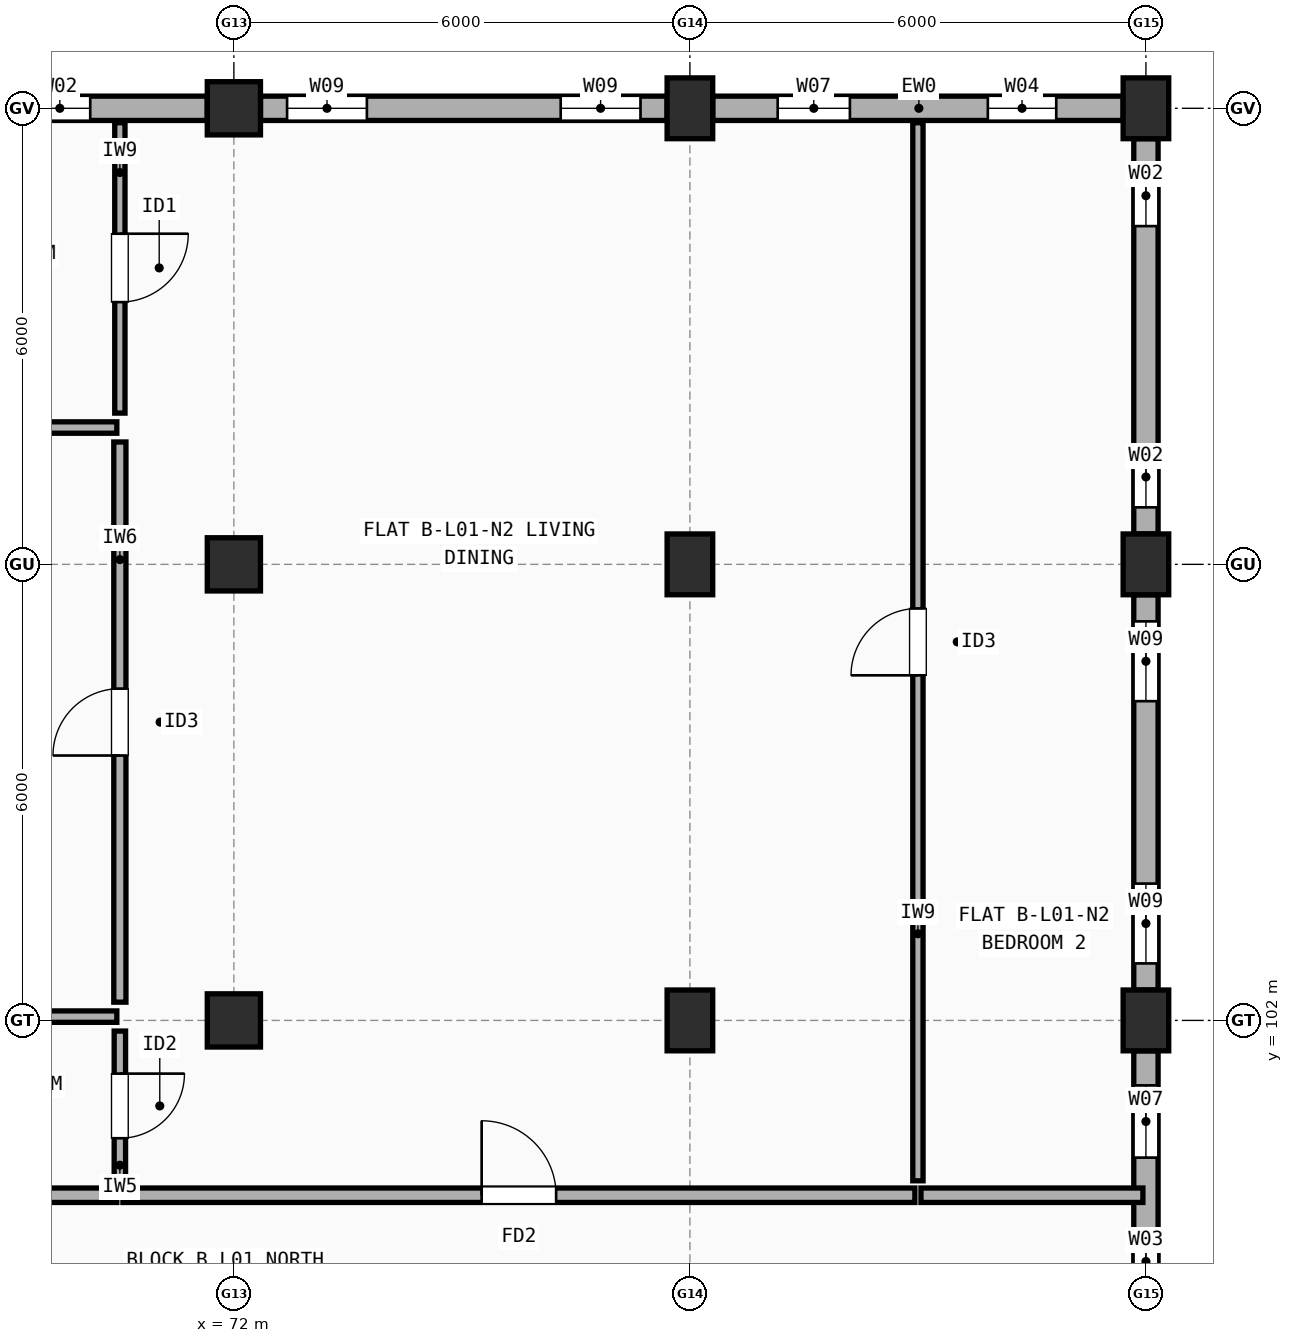
"""IFC4 building model, lengths in metres.
Left out: names, types, materials, properties, quantities, classifications, styles, units other than length and angle.
Written with IfcOpenShell. Run it as: python <this file> out.ifc"""

import sys

from ifc_helpers import new_model, si_unit, direction, frame, frame_2d, origin, origin_2d, place, context, subcontext, project, spatial, rectangle, extrude, element, fill, save


model = new_model("IFC4")
c1 = context("Model", 3, precision=1e-05, world=origin(), true_north=direction((0.0, 1.0)))
c2 = subcontext(c1, "Body", "Model", "MODEL_VIEW")
j1 = project(units=[si_unit("LENGTHUNIT", "METRE"), si_unit("PLANEANGLEUNIT", "RADIAN")], contexts=[c1])
p1 = place(None, origin())
s1 = spatial("IfcSite", under=j1, at=p1, CompositionType="ELEMENT")
p2 = place(p1, origin())
s2 = spatial("IfcBuilding", under=s1, at=p2, CompositionType="ELEMENT")
p3 = place(p2, frame((0.0, 0.0, 4.5)))
s3 = spatial("IfcBuildingStorey", under=s2, at=p3, CompositionType="ELEMENT", Elevation=4.5)
for number, where, z_axis, x_axis in (
    (1, (72.0, 102.0, 0.0), (0.0, 0.0, 1.0), (1.0, 0.0, 0.0)),
    (2, (72.0, 108.0, 0.0), (0.0, 0.0, 1.0), (1.0, 0.0, 0.0)),
    (3, (72.0, 114.0, 0.0), (0.0, 0.0, 1.0), (1.0, 0.0, 0.0)),
):
    element("IfcColumn", number, at=place(p3, frame(where, z_axis=z_axis, x_axis=x_axis)), inside=s3, PredefinedType="COLUMN", context=c2, shape_type="SweptSolid", body=[
        extrude(rectangle(XDim=0.7, YDim=0.7, at=origin_2d()), origin(), (0.0, 0.0, 1.0), 2.945),
    ])
for number, where, z_axis, x_axis in (
    (4, (78.0, 102.0, 0.0), (0.0, 0.0, 1.0), (1.0, 0.0, 0.0)),
    (5, (78.0, 108.0, 0.0), (0.0, 0.0, 1.0), (1.0, 0.0, 0.0)),
    (6, (78.0, 114.0, 0.0), (0.0, 0.0, 1.0), (1.0, 0.0, 0.0)),
    (7, (84.0, 102.0, 0.0), (0.0, 0.0, 1.0), (1.0, 0.0, 0.0)),
    (8, (84.0, 108.0, 0.0), (0.0, 0.0, 1.0), (1.0, 0.0, 0.0)),
    (9, (84.0, 114.0, 0.0), (0.0, 0.0, 1.0), (1.0, 0.0, 0.0)),
):
    element("IfcColumn", number, at=place(p3, frame(where, z_axis=z_axis, x_axis=x_axis)), inside=s3, PredefinedType="COLUMN", context=c2, shape_type="SweptSolid", body=[
        extrude(rectangle(XDim=0.6, YDim=0.8, at=origin_2d()), origin(), (0.0, 0.0, 1.0), 2.945),
    ])
p4 = place(p3, frame((84.0, 96.4, 0.0), z_axis=(0.0, 0.0, 1.0), x_axis=(0.0, 1.0, 0.0)))
e10 = element("IfcWall", 10, at=p4, inside=s3, PredefinedType="STANDARD", context=c2, shape_type="SweptSolid", body=[
    extrude(rectangle(XDim=5.2, YDim=0.32, at=frame_2d((2.6, 0.0))), origin(), (0.0, 0.0, 1.0), 2.427),
])
p5 = place(p4, frame((2.004, 0.0, 0.9)))
e11 = element("IfcOpeningElement", 11, at=p5, cuts=e10, PredefinedType="OPENING", context=c2, shape_type="SweptSolid", body=[
    extrude(rectangle(XDim=0.85, YDim=1.25, at=frame_2d((0.425, 0.625))), frame((0.0, 0.17, 0.0), z_axis=(0.0, -1.0, 0.0), x_axis=(1.0, 0.0, 0.0)), (0.0, 0.0, 1.0), 0.34),
])
p6 = place(p4, frame((3.795, 0.0, 0.9)))
e12 = element("IfcOpeningElement", 12, at=p6, cuts=e10, PredefinedType="OPENING", context=c2, shape_type="SweptSolid", body=[
    extrude(rectangle(XDim=0.95, YDim=1.35, at=frame_2d((0.475, 0.675))), frame((0.0, 0.17, 0.0), z_axis=(0.0, -1.0, 0.0), x_axis=(1.0, 0.0, 0.0)), (0.0, 0.0, 1.0), 0.34),
])
p7 = place(p3, frame((84.0, 102.4, 0.0), z_axis=(0.0, 0.0, 1.0), x_axis=(0.0, 1.0, 0.0)))
e13 = element("IfcWall", 13, at=p7, inside=s3, PredefinedType="STANDARD", context=c2, shape_type="SweptSolid", body=[
    extrude(rectangle(XDim=5.2, YDim=0.32, at=frame_2d((2.6, 0.0))), origin(), (0.0, 0.0, 1.0), 2.427),
])
p8 = place(p7, frame((0.35, 0.0, 0.9)))
e14 = element("IfcOpeningElement", 14, at=p8, cuts=e13, PredefinedType="OPENING", context=c2, shape_type="SweptSolid", body=[
    extrude(rectangle(XDim=1.05, YDim=1.35, at=frame_2d((0.525, 0.675))), frame((0.0, 0.17, 0.0), z_axis=(0.0, -1.0, 0.0), x_axis=(1.0, 0.0, 0.0)), (0.0, 0.0, 1.0), 0.34),
])
p9 = place(p7, frame((3.8, 0.0, 0.9)))
e15 = element("IfcOpeningElement", 15, at=p9, cuts=e13, PredefinedType="OPENING", context=c2, shape_type="SweptSolid", body=[
    extrude(rectangle(XDim=1.05, YDim=1.35, at=frame_2d((0.525, 0.675))), frame((0.0, 0.17, 0.0), z_axis=(0.0, -1.0, 0.0), x_axis=(1.0, 0.0, 0.0)), (0.0, 0.0, 1.0), 0.34),
])
p10 = place(p3, frame((84.0, 108.4, 0.0), z_axis=(0.0, 0.0, 1.0), x_axis=(0.0, 1.0, 0.0)))
e16 = element("IfcWall", 16, at=p10, inside=s3, PredefinedType="STANDARD", context=c2, shape_type="SweptSolid", body=[
    extrude(rectangle(XDim=5.2, YDim=0.32, at=frame_2d((2.6, 0.0))), origin(), (0.0, 0.0, 1.0), 2.427),
])
p11 = place(p10, frame((0.35, 0.0, 0.9)))
e17 = element("IfcOpeningElement", 17, at=p11, cuts=e16, PredefinedType="OPENING", context=c2, shape_type="SweptSolid", body=[
    extrude(rectangle(XDim=0.8, YDim=1.2, at=frame_2d((0.4, 0.6))), frame((0.0, 0.17, 0.0), z_axis=(0.0, -1.0, 0.0), x_axis=(1.0, 0.0, 0.0)), (0.0, 0.0, 1.0), 0.34),
])
p12 = place(p10, frame((4.05, 0.0, 0.9)))
e18 = element("IfcOpeningElement", 18, at=p12, cuts=e16, PredefinedType="OPENING", context=c2, shape_type="SweptSolid", body=[
    extrude(rectangle(XDim=0.8, YDim=1.2, at=frame_2d((0.4, 0.6))), frame((0.0, 0.17, 0.0), z_axis=(0.0, -1.0, 0.0), x_axis=(1.0, 0.0, 0.0)), (0.0, 0.0, 1.0), 0.34),
])
p13 = place(p3, frame((83.7, 114.0, 0.0), z_axis=(0.0, 0.0, 1.0), x_axis=(-1.0, 0.0, 0.0)))
e19 = element("IfcWall", 19, at=p13, inside=s3, PredefinedType="STANDARD", context=c2, shape_type="SweptSolid", body=[
    extrude(rectangle(XDim=5.4, YDim=0.32, at=frame_2d((2.7, 0.0))), origin(), (0.0, 0.0, 1.0), 2.427),
])
p14 = place(p13, frame((0.88, 0.0, 0.9)))
e20 = element("IfcOpeningElement", 20, at=p14, cuts=e19, PredefinedType="OPENING", context=c2, shape_type="SweptSolid", body=[
    extrude(rectangle(XDim=0.9, YDim=1.3, at=frame_2d((0.45, 0.65))), frame((0.0, 0.17, 0.0), z_axis=(0.0, -1.0, 0.0), x_axis=(1.0, 0.0, 0.0)), (0.0, 0.0, 1.0), 0.34),
])
p15 = place(p13, frame((3.595, 0.0, 0.9)))
e21 = element("IfcOpeningElement", 21, at=p15, cuts=e19, PredefinedType="OPENING", context=c2, shape_type="SweptSolid", body=[
    extrude(rectangle(XDim=0.95, YDim=1.35, at=frame_2d((0.475, 0.675))), frame((0.0, 0.17, 0.0), z_axis=(0.0, -1.0, 0.0), x_axis=(1.0, 0.0, 0.0)), (0.0, 0.0, 1.0), 0.34),
])
p16 = place(p3, frame((77.7, 114.0, 0.0), z_axis=(0.0, 0.0, 1.0), x_axis=(-1.0, 0.0, 0.0)))
e22 = element("IfcWall", 22, at=p16, inside=s3, PredefinedType="STANDARD", context=c2, shape_type="SweptSolid", body=[
    extrude(rectangle(XDim=5.35, YDim=0.32, at=frame_2d((2.675, 0.0))), origin(), (0.0, 0.0, 1.0), 2.427),
])
p17 = place(p16, frame((0.35, 0.0, 0.9)))
e23 = element("IfcOpeningElement", 23, at=p17, cuts=e22, PredefinedType="OPENING", context=c2, shape_type="SweptSolid", body=[
    extrude(rectangle(XDim=1.05, YDim=1.35, at=frame_2d((0.525, 0.675))), frame((0.0, 0.17, 0.0), z_axis=(0.0, -1.0, 0.0), x_axis=(1.0, 0.0, 0.0)), (0.0, 0.0, 1.0), 0.34),
])
p18 = place(p16, frame((3.95, 0.0, 0.9)))
e24 = element("IfcOpeningElement", 24, at=p18, cuts=e22, PredefinedType="OPENING", context=c2, shape_type="SweptSolid", body=[
    extrude(rectangle(XDim=1.05, YDim=1.35, at=frame_2d((0.525, 0.675))), frame((0.0, 0.17, 0.0), z_axis=(0.0, -1.0, 0.0), x_axis=(1.0, 0.0, 0.0)), (0.0, 0.0, 1.0), 0.34),
])
p19 = place(p3, frame((71.65, 114.0, 0.0), z_axis=(0.0, 0.0, 1.0), x_axis=(-1.0, 0.0, 0.0)))
e25 = element("IfcWall", 25, at=p19, inside=s3, PredefinedType="STANDARD", context=c2, shape_type="SweptSolid", body=[
    extrude(rectangle(XDim=5.3, YDim=0.32, at=frame_2d((2.65, 0.0))), origin(), (0.0, 0.0, 1.0), 2.427),
])
p20 = place(p19, frame((1.54, 0.0, 0.9)))
e26 = element("IfcOpeningElement", 26, at=p20, cuts=e25, PredefinedType="OPENING", context=c2, shape_type="SweptSolid", body=[
    extrude(rectangle(XDim=0.8, YDim=1.2, at=frame_2d((0.4, 0.6))), frame((0.0, 0.17, 0.0), z_axis=(0.0, -1.0, 0.0), x_axis=(1.0, 0.0, 0.0)), (0.0, 0.0, 1.0), 0.34),
])
p21 = place(p19, frame((4.15, 0.0, 0.9)))
e27 = element("IfcOpeningElement", 27, at=p21, cuts=e25, PredefinedType="OPENING", context=c2, shape_type="SweptSolid", body=[
    extrude(rectangle(XDim=0.8, YDim=1.2, at=frame_2d((0.4, 0.6))), frame((0.0, 0.17, 0.0), z_axis=(0.0, -1.0, 0.0), x_axis=(1.0, 0.0, 0.0)), (0.0, 0.0, 1.0), 0.34),
])
p22 = place(p3, frame((66.04, 99.7, 0.0), z_axis=(0.0, 0.0, 1.0), x_axis=(1.0, 0.0, 0.0)))
e28 = element("IfcWall", 28, at=p22, inside=s3, PredefinedType="SOLIDWALL", context=c2, shape_type="SweptSolid", body=[
    extrude(rectangle(XDim=4.42, YDim=0.19, at=frame_2d((2.21, 0.0))), origin(), (0.0, 0.0, 1.0), 2.945),
])
p23 = place(p3, frame((70.54, 99.7, 0.0), z_axis=(0.0, 0.0, 1.0), x_axis=(1.0, 0.0, 0.0)))
e29 = element("IfcWall", 29, at=p23, inside=s3, PredefinedType="SOLIDWALL", context=c2, shape_type="SweptSolid", body=[
    extrude(rectangle(XDim=10.42, YDim=0.19, at=frame_2d((5.21, 0.0))), origin(), (0.0, 0.0, 1.0), 2.427),
])
p24 = place(p23, frame((4.72, 0.0, 0.0)))
e30 = element("IfcOpeningElement", 30, at=p24, cuts=e29, PredefinedType="OPENING", context=c2, shape_type="SweptSolid", body=[
    extrude(rectangle(XDim=0.98, YDim=2.15, at=frame_2d((0.49, 1.075))), frame((0.0, 0.105, 0.0), z_axis=(0.0, -1.0, 0.0), x_axis=(1.0, 0.0, 0.0)), (0.0, 0.0, 1.0), 0.21),
])
p25 = place(p3, frame((70.5, 109.99, 0.0), z_axis=(0.0, 0.0, 1.0), x_axis=(0.0, 1.0, 0.0)))
e31 = element("IfcWall", 31, at=p25, inside=s3, PredefinedType="PARTITIONING", context=c2, shape_type="SweptSolid", body=[
    extrude(rectangle(XDim=3.82, YDim=0.135, at=frame_2d((1.91, 0.0))), origin(), (0.0, 0.0, 1.0), 2.945),
])
p26 = place(p25, frame((1.46, 0.0, 0.0)))
e32 = element("IfcOpeningElement", 32, at=p26, cuts=e31, PredefinedType="OPENING", context=c2, shape_type="SweptSolid", body=[
    extrude(rectangle(XDim=0.9, YDim=2.1, at=frame_2d((0.45, 1.05))), frame((0.0, 0.077, 0.0), z_axis=(0.0, -1.0, 0.0), x_axis=(1.0, 0.0, 0.0)), (0.0, 0.0, 1.0), 0.155),
])
p27 = place(p3, frame((70.5, 102.24, 0.0), z_axis=(0.0, 0.0, 1.0), x_axis=(0.0, 1.0, 0.0)))
e33 = element("IfcWall", 33, at=p27, inside=s3, PredefinedType="PLUMBINGWALL", context=c2, shape_type="SweptSolid", body=[
    extrude(rectangle(XDim=7.37, YDim=0.16, at=frame_2d((3.685, 0.0))), origin(), (0.0, 0.0, 1.0), 2.427),
])
p28 = place(p27, frame((3.245, 0.0, 0.0)))
e34 = element("IfcOpeningElement", 34, at=p28, cuts=e33, PredefinedType="OPENING", context=c2, shape_type="SweptSolid", body=[
    extrude(rectangle(XDim=0.88, YDim=2.1, at=frame_2d((0.44, 1.05))), frame((0.0, 0.09, 0.0), z_axis=(0.0, -1.0, 0.0), x_axis=(1.0, 0.0, 0.0)), (0.0, 0.0, 1.0), 0.18),
])
p29 = place(p3, frame((70.5, 99.89, 0.0), z_axis=(0.0, 0.0, 1.0), x_axis=(0.0, 1.0, 0.0)))
e35 = element("IfcWall", 35, at=p29, inside=s3, PredefinedType="PARTITIONING", context=c2, shape_type="SweptSolid", body=[
    extrude(rectangle(XDim=1.97, YDim=0.15, at=frame_2d((0.985, 0.0))), origin(), (0.0, 0.0, 1.0), 2.945),
])
p30 = place(p29, frame((0.56, 0.0, 0.0)))
e36 = element("IfcOpeningElement", 36, at=p30, cuts=e35, PredefinedType="OPENING", context=c2, shape_type="SweptSolid", body=[
    extrude(rectangle(XDim=0.85, YDim=2.1, at=frame_2d((0.425, 1.05))), frame((0.0, 0.085, 0.0), z_axis=(0.0, -1.0, 0.0), x_axis=(1.0, 0.0, 0.0)), (0.0, 0.0, 1.0), 0.17),
])
p31 = place(p3, frame((66.04, 109.8, 0.0), z_axis=(0.0, 0.0, 1.0), x_axis=(1.0, 0.0, 0.0)))
e37 = element("IfcWall", 37, at=p31, inside=s3, PredefinedType="PARTITIONING", context=c2, shape_type="SweptSolid", body=[
    extrude(rectangle(XDim=4.42, YDim=0.15, at=frame_2d((2.21, 0.0))), origin(), (0.0, 0.0, 1.0), 2.327),
])
p32 = place(p3, frame((66.36, 102.05, 0.0), z_axis=(0.0, 0.0, 1.0), x_axis=(1.0, 0.0, 0.0)))
e38 = element("IfcWall", 38, at=p32, inside=s3, PredefinedType="PARTITIONING", context=c2, shape_type="SweptSolid", body=[
    extrude(rectangle(XDim=4.1, YDim=0.15, at=frame_2d((2.05, 0.0))), origin(), (0.0, 0.0, 1.0), 2.427),
])
p33 = place(p3, frame((81.04, 99.7, 0.0), z_axis=(0.0, 0.0, 1.0), x_axis=(1.0, 0.0, 0.0)))
e39 = element("IfcWall", 39, at=p33, inside=s3, PredefinedType="SOLIDWALL", context=c2, shape_type="SweptSolid", body=[
    extrude(rectangle(XDim=2.92, YDim=0.19, at=frame_2d((1.46, 0.0))), origin(), (0.0, 0.0, 1.0), 2.427),
])
p34 = place(p3, frame((81.0, 99.89, 0.0), z_axis=(0.0, 0.0, 1.0), x_axis=(0.0, 1.0, 0.0)))
e40 = element("IfcWall", 40, at=p34, inside=s3, PredefinedType="PARTITIONING", context=c2, shape_type="SweptSolid", body=[
    extrude(rectangle(XDim=13.92, YDim=0.135, at=frame_2d((6.96, 0.0))), origin(), (0.0, 0.0, 1.0), 2.427),
])
p35 = place(p34, frame((6.65, 0.0, 0.0)))
e41 = element("IfcOpeningElement", 41, at=p35, cuts=e40, PredefinedType="OPENING", context=c2, shape_type="SweptSolid", body=[
    extrude(rectangle(XDim=0.88, YDim=2.1, at=frame_2d((0.44, 1.05))), frame((0.0, 0.077, 0.0), z_axis=(0.0, -1.0, 0.0), x_axis=(1.0, 0.0, 0.0)), (0.0, 0.0, 1.0), 0.155),
])
p36 = place(p5, origin())
e42 = element("IfcWindow", 42, at=p36, inside=s3, PartitioningType="SINGLE_PANEL", PredefinedType="WINDOW", context=c2, shape_type="SweptSolid", body=[
    extrude(rectangle(XDim=0.85, YDim=1.25, at=frame_2d((0.425, 0.625))), frame((0.0, 0.03, 0.0), z_axis=(0.0, -1.0, 0.0), x_axis=(1.0, 0.0, 0.0)), (0.0, 0.0, 1.0), 0.06),
])
fill(e11, e42)
p37 = place(p6, origin())
e43 = element("IfcWindow", 43, at=p37, inside=s3, PartitioningType="SINGLE_PANEL", PredefinedType="WINDOW", context=c2, shape_type="SweptSolid", body=[
    extrude(rectangle(XDim=0.95, YDim=1.35, at=frame_2d((0.475, 0.675))), frame((0.0, 0.03, 0.0), z_axis=(0.0, -1.0, 0.0), x_axis=(1.0, 0.0, 0.0)), (0.0, 0.0, 1.0), 0.06),
])
fill(e12, e43)
p38 = place(p8, origin())
e44 = element("IfcWindow", 44, at=p38, inside=s3, PartitioningType="SINGLE_PANEL", PredefinedType="WINDOW", context=c2, shape_type="SweptSolid", body=[
    extrude(rectangle(XDim=1.05, YDim=1.35, at=frame_2d((0.525, 0.675))), frame((0.0, 0.03, 0.0), z_axis=(0.0, -1.0, 0.0), x_axis=(1.0, 0.0, 0.0)), (0.0, 0.0, 1.0), 0.06),
])
fill(e14, e44)
p39 = place(p9, origin())
e45 = element("IfcWindow", 45, at=p39, inside=s3, PartitioningType="SINGLE_PANEL", PredefinedType="WINDOW", context=c2, shape_type="SweptSolid", body=[
    extrude(rectangle(XDim=1.05, YDim=1.35, at=frame_2d((0.525, 0.675))), frame((0.0, 0.03, 0.0), z_axis=(0.0, -1.0, 0.0), x_axis=(1.0, 0.0, 0.0)), (0.0, 0.0, 1.0), 0.06),
])
fill(e15, e45)
p40 = place(p11, origin())
e46 = element("IfcWindow", 46, at=p40, inside=s3, PartitioningType="SINGLE_PANEL", PredefinedType="WINDOW", context=c2, shape_type="SweptSolid", body=[
    extrude(rectangle(XDim=0.8, YDim=1.2, at=frame_2d((0.4, 0.6))), frame((0.0, 0.03, 0.0), z_axis=(0.0, -1.0, 0.0), x_axis=(1.0, 0.0, 0.0)), (0.0, 0.0, 1.0), 0.06),
])
fill(e17, e46)
p41 = place(p12, origin())
e47 = element("IfcWindow", 47, at=p41, inside=s3, PartitioningType="SINGLE_PANEL", PredefinedType="WINDOW", context=c2, shape_type="SweptSolid", body=[
    extrude(rectangle(XDim=0.8, YDim=1.2, at=frame_2d((0.4, 0.6))), frame((0.0, 0.03, 0.0), z_axis=(0.0, -1.0, 0.0), x_axis=(1.0, 0.0, 0.0)), (0.0, 0.0, 1.0), 0.06),
])
fill(e18, e47)
p42 = place(p14, origin())
e48 = element("IfcWindow", 48, at=p42, inside=s3, PartitioningType="SINGLE_PANEL", PredefinedType="WINDOW", context=c2, shape_type="SweptSolid", body=[
    extrude(rectangle(XDim=0.9, YDim=1.3, at=frame_2d((0.45, 0.65))), frame((0.0, 0.03, 0.0), z_axis=(0.0, -1.0, 0.0), x_axis=(1.0, 0.0, 0.0)), (0.0, 0.0, 1.0), 0.06),
])
fill(e20, e48)
p43 = place(p15, origin())
e49 = element("IfcWindow", 49, at=p43, inside=s3, PartitioningType="SINGLE_PANEL", PredefinedType="WINDOW", context=c2, shape_type="SweptSolid", body=[
    extrude(rectangle(XDim=0.95, YDim=1.35, at=frame_2d((0.475, 0.675))), frame((0.0, 0.03, 0.0), z_axis=(0.0, -1.0, 0.0), x_axis=(1.0, 0.0, 0.0)), (0.0, 0.0, 1.0), 0.06),
])
fill(e21, e49)
p44 = place(p17, origin())
e50 = element("IfcWindow", 50, at=p44, inside=s3, PartitioningType="SINGLE_PANEL", PredefinedType="WINDOW", context=c2, shape_type="SweptSolid", body=[
    extrude(rectangle(XDim=1.05, YDim=1.35, at=frame_2d((0.525, 0.675))), frame((0.0, 0.03, 0.0), z_axis=(0.0, -1.0, 0.0), x_axis=(1.0, 0.0, 0.0)), (0.0, 0.0, 1.0), 0.06),
])
fill(e23, e50)
p45 = place(p18, origin())
e51 = element("IfcWindow", 51, at=p45, inside=s3, PartitioningType="SINGLE_PANEL", PredefinedType="WINDOW", context=c2, shape_type="SweptSolid", body=[
    extrude(rectangle(XDim=1.05, YDim=1.35, at=frame_2d((0.525, 0.675))), frame((0.0, 0.03, 0.0), z_axis=(0.0, -1.0, 0.0), x_axis=(1.0, 0.0, 0.0)), (0.0, 0.0, 1.0), 0.06),
])
fill(e24, e51)
p46 = place(p20, origin())
e52 = element("IfcWindow", 52, at=p46, inside=s3, PartitioningType="SINGLE_PANEL", PredefinedType="WINDOW", context=c2, shape_type="SweptSolid", body=[
    extrude(rectangle(XDim=0.8, YDim=1.2, at=frame_2d((0.4, 0.6))), frame((0.0, 0.03, 0.0), z_axis=(0.0, -1.0, 0.0), x_axis=(1.0, 0.0, 0.0)), (0.0, 0.0, 1.0), 0.06),
])
fill(e26, e52)
p47 = place(p24, origin())
e53 = element("IfcDoor", 53, at=p47, inside=s3, OperationType="SINGLE_SWING_LEFT", PredefinedType="DOOR", context=c2, shape_type="SweptSolid", body=[
    extrude(rectangle(XDim=0.98, YDim=2.15, at=frame_2d((0.49, 1.075))), frame((0.0, 0.025, 0.0), z_axis=(0.0, -1.0, 0.0), x_axis=(1.0, 0.0, 0.0)), (0.0, 0.0, 1.0), 0.05),
])
fill(e30, e53)
p48 = place(p26, origin())
e54 = element("IfcDoor", 54, at=p48, inside=s3, OperationType="SINGLE_SWING_RIGHT", PredefinedType="DOOR", context=c2, shape_type="SweptSolid", body=[
    extrude(rectangle(XDim=0.9, YDim=2.1, at=frame_2d((0.45, 1.05))), frame((0.0, 0.025, 0.0), z_axis=(0.0, -1.0, 0.0), x_axis=(1.0, 0.0, 0.0)), (0.0, 0.0, 1.0), 0.05),
])
fill(e32, e54)
p49 = place(p28, origin())
e55 = element("IfcDoor", 55, at=p49, inside=s3, OperationType="SINGLE_SWING_LEFT", PredefinedType="DOOR", context=c2, shape_type="SweptSolid", body=[
    extrude(rectangle(XDim=0.88, YDim=2.1, at=frame_2d((0.44, 1.05))), frame((0.0, 0.025, 0.0), z_axis=(0.0, -1.0, 0.0), x_axis=(1.0, 0.0, 0.0)), (0.0, 0.0, 1.0), 0.05),
])
fill(e34, e55)
p50 = place(p30, origin())
e56 = element("IfcDoor", 56, at=p50, inside=s3, OperationType="SINGLE_SWING_RIGHT", PredefinedType="DOOR", context=c2, shape_type="SweptSolid", body=[
    extrude(rectangle(XDim=0.85, YDim=2.1, at=frame_2d((0.425, 1.05))), frame((0.0, 0.025, 0.0), z_axis=(0.0, -1.0, 0.0), x_axis=(1.0, 0.0, 0.0)), (0.0, 0.0, 1.0), 0.05),
])
fill(e36, e56)
p51 = place(p35, origin())
e57 = element("IfcDoor", 57, at=p51, inside=s3, OperationType="SINGLE_SWING_LEFT", PredefinedType="DOOR", context=c2, shape_type="SweptSolid", body=[
    extrude(rectangle(XDim=0.88, YDim=2.1, at=frame_2d((0.44, 1.05))), frame((0.0, 0.025, 0.0), z_axis=(0.0, -1.0, 0.0), x_axis=(1.0, 0.0, 0.0)), (0.0, 0.0, 1.0), 0.05),
])
fill(e41, e57)
save(model, sys.argv[1])
